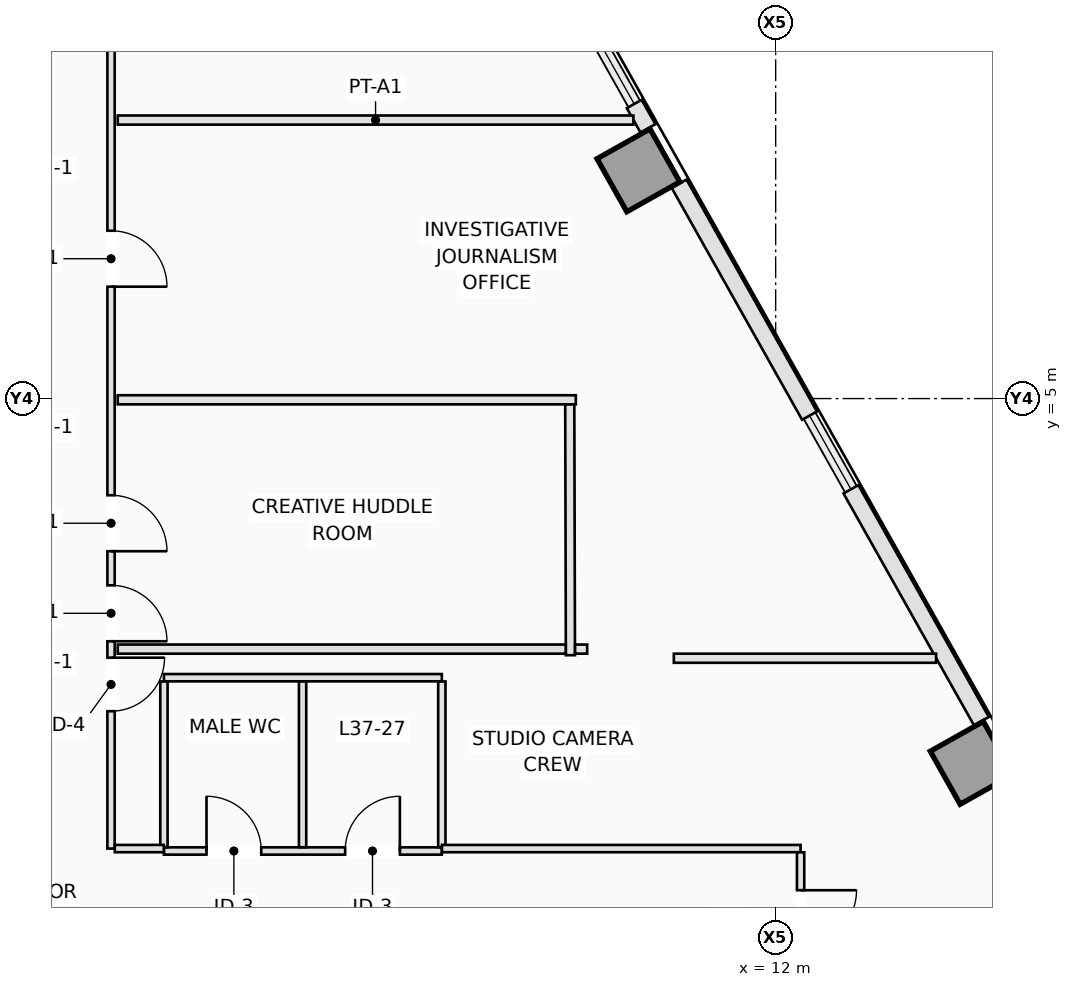
"""IFC4 building model, lengths in metres.
Left out: names, types, materials, properties, quantities, classifications, styles, units other than length and angle.
Written with IfcOpenShell. Run it as: python <this file> out.ifc"""

import sys

from ifc_helpers import new_model, si_unit, direction, frame, frame_2d, origin, origin_2d, place, context, subcontext, project, spatial, rectangle, extrude, element, fill, save


model = new_model("IFC4")
c1 = context("Model", 3, precision=1e-05, world=origin(), true_north=direction((0.0, 1.0)))
c2 = subcontext(c1, "Body", "Model", "MODEL_VIEW")
j1 = project(units=[si_unit("LENGTHUNIT", "METRE"), si_unit("PLANEANGLEUNIT", "RADIAN")], contexts=[c1])
p1 = place(None, origin())
s1 = spatial("IfcSite", under=j1, at=p1, CompositionType="ELEMENT")
p2 = place(p1, origin())
s2 = spatial("IfcBuilding", under=s1, at=p2, CompositionType="ELEMENT")
p3 = place(p2, frame((0.0, 0.0, 137.0)))
s3 = spatial("IfcBuildingStorey", under=s2, at=p3, CompositionType="ELEMENT", Elevation=137.0)
for number, where, z_axis, x_axis in (
    (1, (15.224, -0.991, 0.0), (0.0, 0.0, 1.0), (0.872, 0.49, 0.0)),
    (2, (9.743, 8.753, 0.0), (0.0, 0.0, 1.0), (0.872, 0.49, 0.0)),
):
    element("IfcColumn", number, at=place(p3, frame(where, z_axis=z_axis, x_axis=x_axis)), inside=s3, PredefinedType="COLUMN", context=c2, shape_type="SweptSolid", body=[
        extrude(rectangle(XDim=1.0, YDim=1.0, at=origin_2d()), origin(), (0.0, 0.0, 1.0), 3.5),
    ])
p4 = place(p3, frame((9.674, 9.845, 0.0), z_axis=(0.0, 0.0, 1.0), x_axis=(0.490412424957, -0.871490478116, 0.0)))
e3 = element("IfcWall", 3, at=p4, inside=s3, PredefinedType="STANDARD", context=c2, shape_type="SweptSolid", body=[
    extrude(rectangle(XDim=0.46, YDim=0.28, at=frame_2d((0.23, 0.0))), origin(), (0.0, 0.0, 1.0), 3.25),
])
p5 = place(p3, frame((10.412, 8.533, 0.0), z_axis=(0.0, 0.0, 1.0), x_axis=(0.490274486291, -0.871568085747, 0.0)))
e4 = element("IfcWall", 4, at=p5, inside=s3, PredefinedType="STANDARD", context=c2, shape_type="SweptSolid", body=[
    extrude(rectangle(XDim=4.375, YDim=0.28, at=frame_2d((2.188, 0.0))), origin(), (0.0, 0.0, 1.0), 3.25),
])
p6 = place(p3, frame((13.238, 3.509, 0.0), z_axis=(0.0, 0.0, 1.0), x_axis=(0.490232095789, -0.871591929895, 0.0)))
e5 = element("IfcWall", 5, at=p6, inside=s3, PredefinedType="STANDARD", context=c2, shape_type="SweptSolid", body=[
    extrude(rectangle(XDim=4.375, YDim=0.28, at=frame_2d((2.188, 0.0))), origin(), (0.0, 0.0, 1.0), 3.25),
])
p7 = place(p3, frame((1.94, -2.44, 0.0), z_axis=(0.0, 0.0, 1.0), x_axis=(1.0, 0.0, 0.0)))
e6 = element("IfcWall", 6, at=p7, inside=s3, PredefinedType="PARTITIONING", context=c2, shape_type="SweptSolid", body=[
    extrude(rectangle(XDim=4.57, YDim=0.12, at=frame_2d((2.285, 0.0))), origin(), (0.0, 0.0, 1.0), 2.891),
])
p8 = place(p7, frame((0.7, 0.0, 0.0)))
e7 = element("IfcOpeningElement", 7, at=p8, cuts=e6, PredefinedType="OPENING", context=c2, shape_type="SweptSolid", body=[
    extrude(rectangle(XDim=0.9, YDim=2.12, at=frame_2d((0.45, 1.06))), frame((0.0, 0.07, 0.0), z_axis=(0.0, -1.0, 0.0), x_axis=(1.0, 0.0, 0.0)), (0.0, 0.0, 1.0), 0.14),
])
p9 = place(p7, frame((2.98, 0.0, 0.0)))
e8 = element("IfcOpeningElement", 8, at=p9, cuts=e6, PredefinedType="OPENING", context=c2, shape_type="SweptSolid", body=[
    extrude(rectangle(XDim=0.9, YDim=2.12, at=frame_2d((0.45, 1.06))), frame((0.0, 0.07, 0.0), z_axis=(0.0, -1.0, 0.0), x_axis=(1.0, 0.0, 0.0)), (0.0, 0.0, 1.0), 0.14),
])
p10 = place(p3, frame((1.94, 0.41, 0.0), z_axis=(0.0, 0.0, 1.0), x_axis=(1.0, 0.0, 0.0)))
e9 = element("IfcWall", 9, at=p10, inside=s3, PredefinedType="PARTITIONING", context=c2, shape_type="SweptSolid", body=[
    extrude(rectangle(XDim=4.57, YDim=0.12, at=frame_2d((2.285, 0.0))), origin(), (0.0, 0.0, 1.0), 3.25),
])
for number, where, z_axis, x_axis in (
    (10, (1.94, -2.378, 0.0), (0.0, 0.0, 1.0), (0.0, 1.0, 0.0)),
    (11, (4.22, -2.378, 0.0), (0.0, 0.0, 1.0), (0.0, 1.0, 0.0)),
    (12, (6.51, -2.378, 0.0), (0.0, 0.0, 1.0), (0.0, 1.0, 0.0)),
):
    element("IfcWall", number, at=place(p3, frame(where, z_axis=z_axis, x_axis=x_axis)), inside=s3, PredefinedType="PARTITIONING", context=c2, shape_type="SweptSolid", body=[
        extrude(rectangle(XDim=2.726, YDim=0.12, at=frame_2d((1.363, 0.0))), origin(), (0.0, 0.0, 1.0), 3.25),
    ])
p11 = place(p3, frame((1.07, 11.088, 0.0), z_axis=(0.0, 0.0, 1.0), x_axis=(0.0, -1.0, 0.0)))
e13 = element("IfcWall", 13, at=p11, inside=s3, PredefinedType="PARTITIONING", context=c2, shape_type="SweptSolid", body=[
    extrude(rectangle(XDim=13.488, YDim=0.12, at=frame_2d((6.744, 0.0))), origin(), (0.0, 0.0, 1.0), 3.25),
])
p12 = place(p11, frame((3.328, 0.0, 0.0)))
e14 = element("IfcOpeningElement", 14, at=p12, cuts=e13, PredefinedType="OPENING", context=c2, shape_type="SweptSolid", body=[
    extrude(rectangle(XDim=0.92, YDim=2.12, at=frame_2d((0.46, 1.06))), frame((0.0, 0.07, 0.0), z_axis=(0.0, -1.0, 0.0), x_axis=(1.0, 0.0, 0.0)), (0.0, 0.0, 1.0), 0.14),
])
p13 = place(p11, frame((7.678, 0.0, 0.0)))
e15 = element("IfcOpeningElement", 15, at=p13, cuts=e13, PredefinedType="OPENING", context=c2, shape_type="SweptSolid", body=[
    extrude(rectangle(XDim=0.92, YDim=2.12, at=frame_2d((0.46, 1.06))), frame((0.0, 0.07, 0.0), z_axis=(0.0, -1.0, 0.0), x_axis=(1.0, 0.0, 0.0)), (0.0, 0.0, 1.0), 0.14),
])
p14 = place(p11, frame((9.159, 0.0, 0.0)))
e16 = element("IfcOpeningElement", 16, at=p14, cuts=e13, PredefinedType="OPENING", context=c2, shape_type="SweptSolid", body=[
    extrude(rectangle(XDim=0.92, YDim=2.12, at=frame_2d((0.46, 1.06))), frame((0.0, 0.07, 0.0), z_axis=(0.0, -1.0, 0.0), x_axis=(1.0, 0.0, 0.0)), (0.0, 0.0, 1.0), 0.14),
])
p15 = place(p11, frame((10.349, 0.0, 0.0)))
e17 = element("IfcOpeningElement", 17, at=p15, cuts=e13, PredefinedType="OPENING", context=c2, shape_type="SweptSolid", body=[
    extrude(rectangle(XDim=0.88, YDim=2.12, at=frame_2d((0.44, 1.06))), frame((0.0, 0.07, 0.0), z_axis=(0.0, -1.0, 0.0), x_axis=(1.0, 0.0, 0.0)), (0.0, 0.0, 1.0), 0.14),
])
p16 = place(p3, frame((1.132, -2.4, 0.0), z_axis=(0.0, 0.0, 1.0), x_axis=(1.0, 0.0, 0.0)))
e18 = element("IfcWall", 18, at=p16, inside=s3, PredefinedType="PARTITIONING", context=c2, shape_type="SweptSolid", body=[
    extrude(rectangle(XDim=0.806, YDim=0.12, at=frame_2d((0.403, 0.0))), origin(), (0.0, 0.0, 1.0), 2.891),
])
p17 = place(p3, frame((6.512, -2.4, 0.0), z_axis=(0.0, 0.0, 1.0), x_axis=(1.0, 0.0, 0.0)))
e19 = element("IfcWall", 19, at=p17, inside=s3, PredefinedType="PARTITIONING", context=c2, shape_type="SweptSolid", body=[
    extrude(rectangle(XDim=5.898, YDim=0.12, at=frame_2d((2.949, 0.0))), origin(), (0.0, 0.0, 1.0), 3.25),
])
p18 = place(p3, frame((12.41, -2.462, 0.0), z_axis=(0.0, 0.0, 1.0), x_axis=(0.0, -1.0, 0.0)))
e20 = element("IfcWall", 20, at=p18, inside=s3, PredefinedType="PARTITIONING", context=c2, shape_type="SweptSolid", body=[
    extrude(rectangle(XDim=1.786, YDim=0.12, at=frame_2d((0.893, 0.0))), origin(), (0.0, 0.0, 1.0), 3.25),
])
p19 = place(p18, frame((0.623, 0.0, 0.0)))
e21 = element("IfcOpeningElement", 21, at=p19, cuts=e20, PredefinedType="OPENING", context=c2, shape_type="SweptSolid", body=[
    extrude(rectangle(XDim=0.92, YDim=2.12, at=frame_2d((0.46, 1.06))), frame((0.0, 0.07, 0.0), z_axis=(0.0, -1.0, 0.0), x_axis=(1.0, 0.0, 0.0)), (0.0, 0.0, 1.0), 0.14),
])
p20 = place(p3, frame((9.66, 9.58, 0.0), z_axis=(0.0, 0.0, 1.0), x_axis=(-1.0, 0.0, 0.0)))
e22 = element("IfcWall", 22, at=p20, inside=s3, PredefinedType="PARTITIONING", context=c2, shape_type="SweptSolid", body=[
    extrude(rectangle(XDim=8.48, YDim=0.15, at=frame_2d((4.24, 0.0))), origin(), (0.0, 0.0, 1.0), 3.25),
])
p21 = place(p3, frame((8.714, 4.98, 0.0), z_axis=(0.0, 0.0, 1.0), x_axis=(-1.0, 0.0, 0.0)))
e23 = element("IfcWall", 23, at=p21, inside=s3, PredefinedType="PARTITIONING", context=c2, shape_type="SweptSolid", body=[
    extrude(rectangle(XDim=7.534, YDim=0.15, at=frame_2d((3.767, 0.0))), origin(), (0.0, 0.0, 1.0), 3.25),
])
p22 = place(p3, frame((8.625, 0.78, 0.0), z_axis=(0.0, 0.0, 1.0), x_axis=(-0.002664604467, 0.999996449935, 0.0)))
e24 = element("IfcWall", 24, at=p22, inside=s3, PredefinedType="PARTITIONING", context=c2, shape_type="SweptSolid", body=[
    extrude(rectangle(XDim=4.123, YDim=0.15, at=frame_2d((2.062, 0.0))), origin(), (0.0, 0.0, 1.0), 3.25),
])
p23 = place(p3, frame((14.638, 0.73, 0.0), z_axis=(0.0, 0.0, 1.0), x_axis=(-1.0, 0.0, 0.0)))
e25 = element("IfcWall", 25, at=p23, inside=s3, PredefinedType="PARTITIONING", context=c2, shape_type="SweptSolid", body=[
    extrude(rectangle(XDim=4.313, YDim=0.15, at=frame_2d((2.156, 0.0))), origin(), (0.0, 0.0, 1.0), 3.25),
])
p24 = place(p3, frame((8.9, 0.88, 0.0), z_axis=(0.0, 0.0, 1.0), x_axis=(-1.0, 0.0, 0.0)))
e26 = element("IfcWall", 26, at=p24, inside=s3, PredefinedType="PARTITIONING", context=c2, shape_type="SweptSolid", body=[
    extrude(rectangle(XDim=0.198, YDim=0.15, at=frame_2d((0.099, 0.0))), origin(), (0.0, 0.0, 1.0), 3.25),
])
p25 = place(p3, frame((8.548, 0.88, 0.0), z_axis=(0.0, 0.0, 1.0), x_axis=(-1.0, 0.0, 0.0)))
e27 = element("IfcWall", 27, at=p25, inside=s3, PredefinedType="PARTITIONING", context=c2, shape_type="SweptSolid", body=[
    extrude(rectangle(XDim=7.368, YDim=0.15, at=frame_2d((3.684, 0.0))), origin(), (0.0, 0.0, 1.0), 3.25),
])
p26 = place(p8, origin())
e28 = element("IfcDoor", 28, at=p26, inside=s3, OperationType="SINGLE_SWING_LEFT", PredefinedType="DOOR", context=c2, shape_type="SweptSolid", body=[
    extrude(rectangle(XDim=0.9, YDim=2.12, at=frame_2d((0.45, 1.06))), frame((0.0, 0.025, 0.0), z_axis=(0.0, -1.0, 0.0), x_axis=(1.0, 0.0, 0.0)), (0.0, 0.0, 1.0), 0.05),
])
fill(e7, e28)
p27 = place(p9, origin())
e29 = element("IfcDoor", 29, at=p27, inside=s3, OperationType="SINGLE_SWING_RIGHT", PredefinedType="DOOR", context=c2, shape_type="SweptSolid", body=[
    extrude(rectangle(XDim=0.9, YDim=2.12, at=frame_2d((0.45, 1.06))), frame((0.0, 0.025, 0.0), z_axis=(0.0, -1.0, 0.0), x_axis=(1.0, 0.0, 0.0)), (0.0, 0.0, 1.0), 0.05),
])
fill(e8, e29)
p28 = place(p12, origin())
e30 = element("IfcDoor", 30, at=p28, inside=s3, OperationType="SINGLE_SWING_RIGHT", PredefinedType="DOOR", context=c2, shape_type="SweptSolid", body=[
    extrude(rectangle(XDim=0.92, YDim=2.12, at=frame_2d((0.46, 1.06))), frame((0.0, 0.025, 0.0), z_axis=(0.0, -1.0, 0.0), x_axis=(1.0, 0.0, 0.0)), (0.0, 0.0, 1.0), 0.05),
])
fill(e14, e30)
p29 = place(p13, origin())
e31 = element("IfcDoor", 31, at=p29, inside=s3, OperationType="SINGLE_SWING_RIGHT", PredefinedType="DOOR", context=c2, shape_type="SweptSolid", body=[
    extrude(rectangle(XDim=0.92, YDim=2.12, at=frame_2d((0.46, 1.06))), frame((0.0, 0.025, 0.0), z_axis=(0.0, -1.0, 0.0), x_axis=(1.0, 0.0, 0.0)), (0.0, 0.0, 1.0), 0.05),
])
fill(e15, e31)
p30 = place(p14, origin())
e32 = element("IfcDoor", 32, at=p30, inside=s3, OperationType="SINGLE_SWING_RIGHT", PredefinedType="DOOR", context=c2, shape_type="SweptSolid", body=[
    extrude(rectangle(XDim=0.92, YDim=2.12, at=frame_2d((0.46, 1.06))), frame((0.0, 0.025, 0.0), z_axis=(0.0, -1.0, 0.0), x_axis=(1.0, 0.0, 0.0)), (0.0, 0.0, 1.0), 0.05),
])
fill(e16, e32)
p31 = place(p19, origin())
e33 = element("IfcDoor", 33, at=p31, inside=s3, OperationType="SINGLE_SWING_LEFT", PredefinedType="DOOR", context=c2, shape_type="SweptSolid", body=[
    extrude(rectangle(XDim=0.92, YDim=2.12, at=frame_2d((0.46, 1.06))), frame((0.0, 0.025, 0.0), z_axis=(0.0, -1.0, 0.0), x_axis=(1.0, 0.0, 0.0)), (0.0, 0.0, 1.0), 0.05),
])
fill(e21, e33)
p32 = place(p15, origin())
e34 = element("IfcDoor", 34, at=p32, inside=s3, OperationType="SINGLE_SWING_LEFT", PredefinedType="DOOR", context=c2, shape_type="SweptSolid", body=[
    extrude(rectangle(XDim=0.88, YDim=2.12, at=frame_2d((0.44, 1.06))), frame((0.0, 0.025, 0.0), z_axis=(0.0, -1.0, 0.0), x_axis=(1.0, 0.0, 0.0)), (0.0, 0.0, 1.0), 0.05),
])
fill(e17, e34)
save(model, sys.argv[1])
